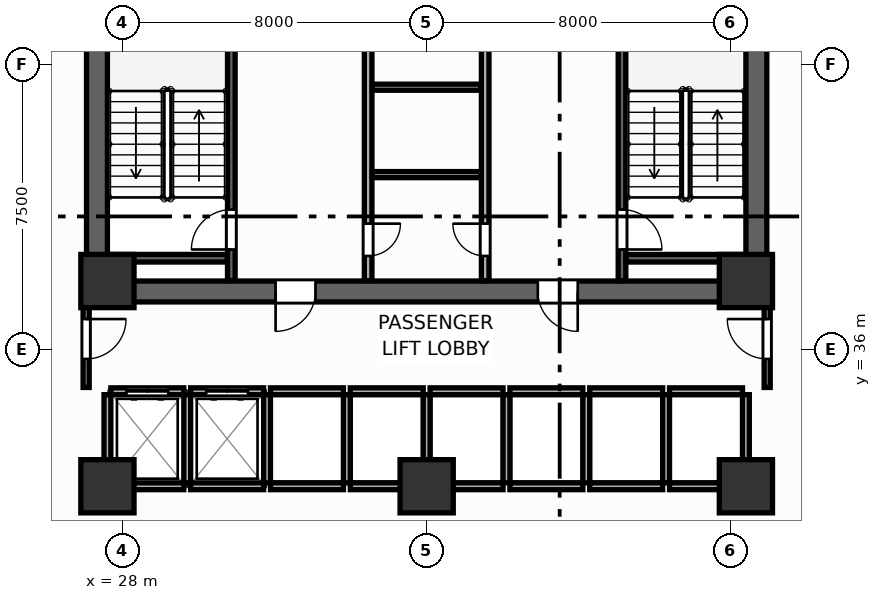
"""IFC4 building model, lengths in metres.
Left out: names, types, materials, properties, quantities, classifications, styles, units other than length and angle.
Written with IfcOpenShell. Run it as: python <this file> out.ifc"""

import sys

from ifc_helpers import new_model, si_unit, direction, frame, frame_2d, origin, origin_2d, place, context, subcontext, project, spatial, rectangle, extrude, source, transform, mapped, element, fill, save


model = new_model("IFC4")
c1 = context("Model", 3, precision=1e-05, world=origin(), true_north=direction((0.0, 1.0)))
c2 = subcontext(c1, "Body", "Model", "MODEL_VIEW")
j1 = project(units=[si_unit("LENGTHUNIT", "METRE"), si_unit("PLANEANGLEUNIT", "RADIAN")], contexts=[c1])
p1 = place(None, origin())
s1 = spatial("IfcSite", under=j1, at=p1, CompositionType="ELEMENT")
p2 = place(p1, origin())
s2 = spatial("IfcBuilding", under=s1, at=p2, CompositionType="ELEMENT")
p3 = place(p2, frame((0.0, 0.0, 24.0)))
s3 = spatial("IfcBuildingStorey", under=s2, at=p3, CompositionType="ELEMENT", Elevation=24.0)
p4 = place(p3, frame((27.05, 37.525, 0.0), z_axis=(0.0, 0.0, 1.0), x_axis=(1.0, 0.0, 0.0)))
e1 = element("IfcWall", 1, at=p4, inside=s3, PredefinedType="SHEAR", context=c2, shape_type="SweptSolid", body=[
    extrude(rectangle(XDim=17.9, YDim=0.55, at=frame_2d((8.95, 0.0))), origin(), (0.0, 0.0, 1.0), 3.9),
])
p5 = place(p4, frame((4.975, 0.0, 0.0)))
e2 = element("IfcOpeningElement", 2, at=p5, cuts=e1, PredefinedType="OPENING", context=c2, shape_type="SweptSolid", body=[
    extrude(rectangle(XDim=1.05, YDim=2.1, at=frame_2d((0.525, 1.05))), frame((0.0, 0.285, 0.0), z_axis=(0.0, -1.0, 0.0), x_axis=(1.0, 0.0, 0.0)), (0.0, 0.0, 1.0), 0.57),
])
p6 = place(p4, frame((11.875, 0.0, 0.0)))
e3 = element("IfcOpeningElement", 3, at=p6, cuts=e1, PredefinedType="OPENING", context=c2, shape_type="SweptSolid", body=[
    extrude(rectangle(XDim=1.05, YDim=2.1, at=frame_2d((0.525, 1.05))), frame((0.0, 0.285, 0.0), z_axis=(0.0, -1.0, 0.0), x_axis=(1.0, 0.0, 0.0)), (0.0, 0.0, 1.0), 0.57),
])
for number, where, z_axis, x_axis in (
    (4, (27.325, 37.8, 0.0), (0.0, 0.0, 1.0), (0.0, 1.0, 0.0)),
    (5, (44.675, 37.8, 0.0), (0.0, 0.0, 1.0), (0.0, 1.0, 0.0)),
):
    element("IfcWall", number, at=place(p3, frame(where, z_axis=z_axis, x_axis=x_axis)), inside=s3, PredefinedType="SHEAR", context=c2, shape_type="SweptSolid", body=[
        extrude(rectangle(XDim=9.0, YDim=0.55, at=frame_2d((4.5, 0.0))), origin(), (0.0, 0.0, 1.0), 3.9),
    ])
m1 = source(origin(), c2, "Body", "SweptSolid", [
    extrude(rectangle(XDim=1.4, YDim=1.4, at=origin_2d()), origin(), (0.0, 0.0, 1.0), 3.9),
])
for number, where, z_axis, x_axis in (
    (6, (27.6, 37.8, 0.0), (0.0, 0.0, 1.0), (1.0, 0.0, 0.0)),
    (7, (44.4, 37.8, 0.0), (0.0, 0.0, 1.0), (1.0, 0.0, 0.0)),
    (8, (27.6, 32.4, 0.0), (0.0, 0.0, 1.0), (1.0, 0.0, 0.0)),
    (9, (44.4, 32.4, 0.0), (0.0, 0.0, 1.0), (1.0, 0.0, 0.0)),
    (10, (36.0, 32.4, 0.0), (0.0, 0.0, 1.0), (1.0, 0.0, 0.0)),
):
    element("IfcColumn", number, at=place(p3, frame(where, z_axis=z_axis, x_axis=x_axis)), inside=s3, PredefinedType="COLUMN", context=c2, shape_type="MappedRepresentation", body=[
        mapped(m1, transform((0.0, 0.0, 0.0), scale=1.0)),
    ])
p7 = place(p3, frame((30.86, 37.81, 0.0), z_axis=(0.0, 0.0, 1.0), x_axis=(0.0, 1.0, 0.0)))
e11 = element("IfcWall", 11, at=p7, inside=s3, PredefinedType="SHEAR", context=c2, shape_type="SweptSolid", body=[
    extrude(rectangle(XDim=8.98, YDim=0.2, at=frame_2d((4.49, 0.0))), origin(), (0.0, 0.0, 1.0), 3.9),
])
p8 = place(p7, frame((0.82, 0.0, 0.0)))
e12 = element("IfcOpeningElement", 12, at=p8, cuts=e11, PredefinedType="OPENING", context=c2, shape_type="SweptSolid", body=[
    extrude(rectangle(XDim=1.05, YDim=2.1, at=frame_2d((0.525, 1.05))), frame((0.0, 0.11, 0.0), z_axis=(0.0, -1.0, 0.0), x_axis=(1.0, 0.0, 0.0)), (0.0, 0.0, 1.0), 0.22),
])
p9 = place(p3, frame((27.61, 38.4, 0.0), z_axis=(0.0, 0.0, 1.0), x_axis=(1.0, 0.0, 0.0)))
e13 = element("IfcWall", 13, at=p9, inside=s3, PredefinedType="SHEAR", context=c2, shape_type="SweptSolid", body=[
    extrude(rectangle(XDim=3.14, YDim=0.2, at=frame_2d((1.57, 0.0))), origin(), (0.0, 0.0, 1.0), 3.9),
])
p10 = place(p3, frame((41.14, 37.81, 0.0), z_axis=(0.0, 0.0, 1.0), x_axis=(0.0, 1.0, 0.0)))
e14 = element("IfcWall", 14, at=p10, inside=s3, PredefinedType="SHEAR", context=c2, shape_type="SweptSolid", body=[
    extrude(rectangle(XDim=8.98, YDim=0.2, at=frame_2d((4.49, 0.0))), origin(), (0.0, 0.0, 1.0), 3.9),
])
p11 = place(p10, frame((0.82, 0.0, 0.0)))
e15 = element("IfcOpeningElement", 15, at=p11, cuts=e14, PredefinedType="OPENING", context=c2, shape_type="SweptSolid", body=[
    extrude(rectangle(XDim=1.05, YDim=2.1, at=frame_2d((0.525, 1.05))), frame((0.0, 0.11, 0.0), z_axis=(0.0, -1.0, 0.0), x_axis=(1.0, 0.0, 0.0)), (0.0, 0.0, 1.0), 0.22),
])
p12 = place(p3, frame((41.25, 38.4, 0.0), z_axis=(0.0, 0.0, 1.0), x_axis=(1.0, 0.0, 0.0)))
e16 = element("IfcWall", 16, at=p12, inside=s3, PredefinedType="SHEAR", context=c2, shape_type="SweptSolid", body=[
    extrude(rectangle(XDim=3.14, YDim=0.2, at=frame_2d((1.57, 0.0))), origin(), (0.0, 0.0, 1.0), 3.9),
])
p13 = place(p3, frame((34.46, 37.81, 0.0), z_axis=(0.0, 0.0, 1.0), x_axis=(0.0, 1.0, 0.0)))
e17 = element("IfcWall", 17, at=p13, inside=s3, PredefinedType="PARTITIONING", context=c2, shape_type="SweptSolid", body=[
    extrude(rectangle(XDim=8.98, YDim=0.2, at=frame_2d((4.49, 0.0))), origin(), (0.0, 0.0, 1.0), 3.68),
])
p14 = place(p13, frame((0.65, 0.0, 0.0)))
e18 = element("IfcOpeningElement", 18, at=p14, cuts=e17, PredefinedType="OPENING", context=c2, shape_type="SweptSolid", body=[
    extrude(rectangle(XDim=0.85, YDim=2.05, at=frame_2d((0.425, 1.025))), frame((0.0, 0.11, 0.0), z_axis=(0.0, -1.0, 0.0), x_axis=(1.0, 0.0, 0.0)), (0.0, 0.0, 1.0), 0.22),
])
p15 = place(p3, frame((37.54, 37.81, 0.0), z_axis=(0.0, 0.0, 1.0), x_axis=(0.0, 1.0, 0.0)))
e19 = element("IfcWall", 19, at=p15, inside=s3, PredefinedType="PARTITIONING", context=c2, shape_type="SweptSolid", body=[
    extrude(rectangle(XDim=8.98, YDim=0.2, at=frame_2d((4.49, 0.0))), origin(), (0.0, 0.0, 1.0), 3.68),
])
p16 = place(p15, frame((0.65, 0.0, 0.0)))
e20 = element("IfcOpeningElement", 20, at=p16, cuts=e19, PredefinedType="OPENING", context=c2, shape_type="SweptSolid", body=[
    extrude(rectangle(XDim=0.85, YDim=2.05, at=frame_2d((0.425, 1.025))), frame((0.0, 0.11, 0.0), z_axis=(0.0, -1.0, 0.0), x_axis=(1.0, 0.0, 0.0)), (0.0, 0.0, 1.0), 0.22),
])
for number, where, z_axis, x_axis in (
    (21, (34.57, 40.6, 0.0), (0.0, 0.0, 1.0), (1.0, 0.0, 0.0)),
    (22, (34.57, 42.9, 0.0), (0.0, 0.0, 1.0), (1.0, 0.0, 0.0)),
):
    element("IfcWall", number, at=place(p3, frame(where, z_axis=z_axis, x_axis=x_axis)), inside=s3, PredefinedType="PARTITIONING", context=c2, shape_type="SweptSolid", body=[
        extrude(rectangle(XDim=2.86, YDim=0.16, at=frame_2d((1.43, 0.0))), origin(), (0.0, 0.0, 1.0), 3.68),
    ])
p17 = place(p3, frame((27.69, 34.9, 0.0), z_axis=(0.0, 0.0, 1.0), x_axis=(1.0, 0.0, 0.0)))
e23 = element("IfcWall", 23, at=p17, inside=s3, PredefinedType="PARTITIONING", context=c2, shape_type="SweptSolid", body=[
    extrude(rectangle(XDim=1.92, YDim=0.18, at=frame_2d((0.96, 0.0))), origin(), (0.0, 0.0, 1.0), 3.68),
])
p18 = place(p17, frame((0.41, 0.0, 0.0)))
e24 = element("IfcOpeningElement", 24, at=p18, cuts=e23, PredefinedType="OPENING", context=c2, shape_type="SweptSolid", body=[
    extrude(rectangle(XDim=1.1, YDim=2.1, at=frame_2d((0.55, 1.05))), frame((0.0, 0.1, 0.0), z_axis=(0.0, -1.0, 0.0), x_axis=(1.0, 0.0, 0.0)), (0.0, 0.0, 1.0), 0.2),
])
p19 = place(p3, frame((27.69, 32.4, 0.0), z_axis=(0.0, 0.0, 1.0), x_axis=(1.0, 0.0, 0.0)))
e25 = element("IfcWall", 25, at=p19, inside=s3, PredefinedType="PARTITIONING", context=c2, shape_type="SweptSolid", body=[
    extrude(rectangle(XDim=1.92, YDim=0.18, at=frame_2d((0.96, 0.0))), origin(), (0.0, 0.0, 1.0), 3.18),
])
p20 = place(p3, frame((27.6, 32.49, 0.0), z_axis=(0.0, 0.0, 1.0), x_axis=(0.0, 1.0, 0.0)))
e26 = element("IfcWall", 26, at=p20, inside=s3, PredefinedType="PARTITIONING", context=c2, shape_type="SweptSolid", body=[
    extrude(rectangle(XDim=2.32, YDim=0.18, at=frame_2d((1.16, 0.0))), origin(), (0.0, 0.0, 1.0), 3.68),
])
p21 = place(p3, frame((29.79, 34.9, 0.0), z_axis=(0.0, 0.0, 1.0), x_axis=(1.0, 0.0, 0.0)))
e27 = element("IfcWall", 27, at=p21, inside=s3, PredefinedType="PARTITIONING", context=c2, shape_type="SweptSolid", body=[
    extrude(rectangle(XDim=1.92, YDim=0.18, at=frame_2d((0.96, 0.0))), origin(), (0.0, 0.0, 1.0), 3.68),
])
p22 = place(p21, frame((0.41, 0.0, 0.0)))
e28 = element("IfcOpeningElement", 28, at=p22, cuts=e27, PredefinedType="OPENING", context=c2, shape_type="SweptSolid", body=[
    extrude(rectangle(XDim=1.1, YDim=2.1, at=frame_2d((0.55, 1.05))), frame((0.0, 0.1, 0.0), z_axis=(0.0, -1.0, 0.0), x_axis=(1.0, 0.0, 0.0)), (0.0, 0.0, 1.0), 0.2),
])
p23 = place(p3, frame((29.79, 32.4, 0.0), z_axis=(0.0, 0.0, 1.0), x_axis=(1.0, 0.0, 0.0)))
e29 = element("IfcWall", 29, at=p23, inside=s3, PredefinedType="PARTITIONING", context=c2, shape_type="SweptSolid", body=[
    extrude(rectangle(XDim=1.92, YDim=0.18, at=frame_2d((0.96, 0.0))), origin(), (0.0, 0.0, 1.0), 3.18),
])
p24 = place(p3, frame((29.7, 32.49, 0.0), z_axis=(0.0, 0.0, 1.0), x_axis=(0.0, 1.0, 0.0)))
e30 = element("IfcWall", 30, at=p24, inside=s3, PredefinedType="PARTITIONING", context=c2, shape_type="SweptSolid", body=[
    extrude(rectangle(XDim=2.32, YDim=0.18, at=frame_2d((1.16, 0.0))), origin(), (0.0, 0.0, 1.0), 3.68),
])
p25 = place(p3, frame((31.89, 34.9, 0.0), z_axis=(0.0, 0.0, 1.0), x_axis=(1.0, 0.0, 0.0)))
e31 = element("IfcWall", 31, at=p25, inside=s3, PredefinedType="PARTITIONING", context=c2, shape_type="SweptSolid", body=[
    extrude(rectangle(XDim=1.92, YDim=0.18, at=frame_2d((0.96, 0.0))), origin(), (0.0, 0.0, 1.0), 3.68),
])
p26 = place(p3, frame((31.89, 32.4, 0.0), z_axis=(0.0, 0.0, 1.0), x_axis=(1.0, 0.0, 0.0)))
e32 = element("IfcWall", 32, at=p26, inside=s3, PredefinedType="PARTITIONING", context=c2, shape_type="SweptSolid", body=[
    extrude(rectangle(XDim=1.92, YDim=0.18, at=frame_2d((0.96, 0.0))), origin(), (0.0, 0.0, 1.0), 3.18),
])
p27 = place(p3, frame((31.8, 32.49, 0.0), z_axis=(0.0, 0.0, 1.0), x_axis=(0.0, 1.0, 0.0)))
e33 = element("IfcWall", 33, at=p27, inside=s3, PredefinedType="PARTITIONING", context=c2, shape_type="SweptSolid", body=[
    extrude(rectangle(XDim=2.32, YDim=0.18, at=frame_2d((1.16, 0.0))), origin(), (0.0, 0.0, 1.0), 3.68),
])
p28 = place(p3, frame((33.99, 34.9, 0.0), z_axis=(0.0, 0.0, 1.0), x_axis=(1.0, 0.0, 0.0)))
e34 = element("IfcWall", 34, at=p28, inside=s3, PredefinedType="PARTITIONING", context=c2, shape_type="SweptSolid", body=[
    extrude(rectangle(XDim=1.92, YDim=0.18, at=frame_2d((0.96, 0.0))), origin(), (0.0, 0.0, 1.0), 3.68),
])
p29 = place(p3, frame((33.99, 32.4, 0.0), z_axis=(0.0, 0.0, 1.0), x_axis=(1.0, 0.0, 0.0)))
e35 = element("IfcWall", 35, at=p29, inside=s3, PredefinedType="PARTITIONING", context=c2, shape_type="SweptSolid", body=[
    extrude(rectangle(XDim=1.92, YDim=0.18, at=frame_2d((0.96, 0.0))), origin(), (0.0, 0.0, 1.0), 3.18),
])
p30 = place(p3, frame((33.9, 32.49, 0.0), z_axis=(0.0, 0.0, 1.0), x_axis=(0.0, 1.0, 0.0)))
e36 = element("IfcWall", 36, at=p30, inside=s3, PredefinedType="PARTITIONING", context=c2, shape_type="SweptSolid", body=[
    extrude(rectangle(XDim=2.32, YDim=0.18, at=frame_2d((1.16, 0.0))), origin(), (0.0, 0.0, 1.0), 3.68),
])
p31 = place(p3, frame((36.09, 34.9, 0.0), z_axis=(0.0, 0.0, 1.0), x_axis=(1.0, 0.0, 0.0)))
e37 = element("IfcWall", 37, at=p31, inside=s3, PredefinedType="PARTITIONING", context=c2, shape_type="SweptSolid", body=[
    extrude(rectangle(XDim=1.92, YDim=0.18, at=frame_2d((0.96, 0.0))), origin(), (0.0, 0.0, 1.0), 3.68),
])
p32 = place(p3, frame((36.09, 32.4, 0.0), z_axis=(0.0, 0.0, 1.0), x_axis=(1.0, 0.0, 0.0)))
e38 = element("IfcWall", 38, at=p32, inside=s3, PredefinedType="PARTITIONING", context=c2, shape_type="SweptSolid", body=[
    extrude(rectangle(XDim=1.92, YDim=0.18, at=frame_2d((0.96, 0.0))), origin(), (0.0, 0.0, 1.0), 3.18),
])
p33 = place(p3, frame((36.0, 32.49, 0.0), z_axis=(0.0, 0.0, 1.0), x_axis=(0.0, 1.0, 0.0)))
e39 = element("IfcWall", 39, at=p33, inside=s3, PredefinedType="PARTITIONING", context=c2, shape_type="SweptSolid", body=[
    extrude(rectangle(XDim=2.32, YDim=0.18, at=frame_2d((1.16, 0.0))), origin(), (0.0, 0.0, 1.0), 3.68),
])
p34 = place(p3, frame((38.19, 34.9, 0.0), z_axis=(0.0, 0.0, 1.0), x_axis=(1.0, 0.0, 0.0)))
e40 = element("IfcWall", 40, at=p34, inside=s3, PredefinedType="PARTITIONING", context=c2, shape_type="SweptSolid", body=[
    extrude(rectangle(XDim=1.92, YDim=0.18, at=frame_2d((0.96, 0.0))), origin(), (0.0, 0.0, 1.0), 3.68),
])
p35 = place(p3, frame((38.19, 32.4, 0.0), z_axis=(0.0, 0.0, 1.0), x_axis=(1.0, 0.0, 0.0)))
e41 = element("IfcWall", 41, at=p35, inside=s3, PredefinedType="PARTITIONING", context=c2, shape_type="SweptSolid", body=[
    extrude(rectangle(XDim=1.92, YDim=0.18, at=frame_2d((0.96, 0.0))), origin(), (0.0, 0.0, 1.0), 3.18),
])
p36 = place(p3, frame((38.1, 32.49, 0.0), z_axis=(0.0, 0.0, 1.0), x_axis=(0.0, 1.0, 0.0)))
e42 = element("IfcWall", 42, at=p36, inside=s3, PredefinedType="PARTITIONING", context=c2, shape_type="SweptSolid", body=[
    extrude(rectangle(XDim=2.32, YDim=0.18, at=frame_2d((1.16, 0.0))), origin(), (0.0, 0.0, 1.0), 3.68),
])
p37 = place(p3, frame((40.29, 34.9, 0.0), z_axis=(0.0, 0.0, 1.0), x_axis=(1.0, 0.0, 0.0)))
e43 = element("IfcWall", 43, at=p37, inside=s3, PredefinedType="PARTITIONING", context=c2, shape_type="SweptSolid", body=[
    extrude(rectangle(XDim=1.92, YDim=0.18, at=frame_2d((0.96, 0.0))), origin(), (0.0, 0.0, 1.0), 3.68),
])
p38 = place(p3, frame((40.29, 32.4, 0.0), z_axis=(0.0, 0.0, 1.0), x_axis=(1.0, 0.0, 0.0)))
e44 = element("IfcWall", 44, at=p38, inside=s3, PredefinedType="PARTITIONING", context=c2, shape_type="SweptSolid", body=[
    extrude(rectangle(XDim=1.92, YDim=0.18, at=frame_2d((0.96, 0.0))), origin(), (0.0, 0.0, 1.0), 3.18),
])
p39 = place(p3, frame((40.2, 32.49, 0.0), z_axis=(0.0, 0.0, 1.0), x_axis=(0.0, 1.0, 0.0)))
e45 = element("IfcWall", 45, at=p39, inside=s3, PredefinedType="PARTITIONING", context=c2, shape_type="SweptSolid", body=[
    extrude(rectangle(XDim=2.32, YDim=0.18, at=frame_2d((1.16, 0.0))), origin(), (0.0, 0.0, 1.0), 3.68),
])
p40 = place(p3, frame((42.39, 34.9, 0.0), z_axis=(0.0, 0.0, 1.0), x_axis=(1.0, 0.0, 0.0)))
e46 = element("IfcWall", 46, at=p40, inside=s3, PredefinedType="PARTITIONING", context=c2, shape_type="SweptSolid", body=[
    extrude(rectangle(XDim=1.92, YDim=0.18, at=frame_2d((0.96, 0.0))), origin(), (0.0, 0.0, 1.0), 3.68),
])
p41 = place(p3, frame((42.39, 32.4, 0.0), z_axis=(0.0, 0.0, 1.0), x_axis=(1.0, 0.0, 0.0)))
e47 = element("IfcWall", 47, at=p41, inside=s3, PredefinedType="PARTITIONING", context=c2, shape_type="SweptSolid", body=[
    extrude(rectangle(XDim=1.92, YDim=0.18, at=frame_2d((0.96, 0.0))), origin(), (0.0, 0.0, 1.0), 3.18),
])
for number, where, z_axis, x_axis in (
    (48, (42.3, 32.49, 0.0), (0.0, 0.0, 1.0), (0.0, 1.0, 0.0)),
    (49, (44.4, 32.49, 0.0), (0.0, 0.0, 1.0), (0.0, 1.0, 0.0)),
):
    element("IfcWall", number, at=place(p3, frame(where, z_axis=z_axis, x_axis=x_axis)), inside=s3, PredefinedType="PARTITIONING", context=c2, shape_type="SweptSolid", body=[
        extrude(rectangle(XDim=2.32, YDim=0.18, at=frame_2d((1.16, 0.0))), origin(), (0.0, 0.0, 1.0), 3.68),
    ])
p42 = place(p3, frame((27.04, 35.0, 0.0), z_axis=(0.0, 0.0, 1.0), x_axis=(0.0, 1.0, 0.0)))
e50 = element("IfcWall", 50, at=p42, inside=s3, PredefinedType="PARTITIONING", context=c2, shape_type="SweptSolid", body=[
    extrude(rectangle(XDim=2.65, YDim=0.16, at=frame_2d((1.325, 0.0))), origin(), (0.0, 0.0, 1.0), 3.68),
])
p43 = place(p42, frame((0.75, 0.0, 0.0)))
e51 = element("IfcOpeningElement", 51, at=p43, cuts=e50, PredefinedType="OPENING", context=c2, shape_type="SweptSolid", body=[
    extrude(rectangle(XDim=1.05, YDim=2.1, at=frame_2d((0.525, 1.05))), frame((0.0, 0.09, 0.0), z_axis=(0.0, -1.0, 0.0), x_axis=(1.0, 0.0, 0.0)), (0.0, 0.0, 1.0), 0.18),
])
p44 = place(p3, frame((44.96, 35.0, 0.0), z_axis=(0.0, 0.0, 1.0), x_axis=(0.0, 1.0, 0.0)))
e52 = element("IfcWall", 52, at=p44, inside=s3, PredefinedType="PARTITIONING", context=c2, shape_type="SweptSolid", body=[
    extrude(rectangle(XDim=2.65, YDim=0.16, at=frame_2d((1.325, 0.0))), origin(), (0.0, 0.0, 1.0), 3.68),
])
p45 = place(p44, frame((0.75, 0.0, 0.0)))
e53 = element("IfcOpeningElement", 53, at=p45, cuts=e52, PredefinedType="OPENING", context=c2, shape_type="SweptSolid", body=[
    extrude(rectangle(XDim=1.05, YDim=2.1, at=frame_2d((0.525, 1.05))), frame((0.0, 0.09, 0.0), z_axis=(0.0, -1.0, 0.0), x_axis=(1.0, 0.0, 0.0)), (0.0, 0.0, 1.0), 0.18),
])
p46 = place(p8, origin())
e54 = element("IfcDoor", 54, at=p46, inside=s3, OperationType="SINGLE_SWING_LEFT", PredefinedType="DOOR", context=c2, shape_type="SweptSolid", body=[
    extrude(rectangle(XDim=1.05, YDim=2.1, at=frame_2d((0.525, 1.05))), frame((0.0, 0.025, 0.0), z_axis=(0.0, -1.0, 0.0), x_axis=(1.0, 0.0, 0.0)), (0.0, 0.0, 1.0), 0.05),
])
fill(e12, e54)
p47 = place(p11, frame((1.05, 0.0, 0.0), z_axis=(0.0, 0.0, 1.0), x_axis=(-1.0, 0.0, 0.0)))
e55 = element("IfcDoor", 55, at=p47, inside=s3, OperationType="SINGLE_SWING_RIGHT", PredefinedType="DOOR", context=c2, shape_type="SweptSolid", body=[
    extrude(rectangle(XDim=1.05, YDim=2.1, at=frame_2d((0.525, 1.05))), frame((0.0, 0.025, 0.0), z_axis=(0.0, -1.0, 0.0), x_axis=(1.0, 0.0, 0.0)), (0.0, 0.0, 1.0), 0.05),
])
fill(e15, e55)
p48 = place(p14, frame((0.85, 0.0, 0.0), z_axis=(0.0, 0.0, 1.0), x_axis=(-1.0, 0.0, 0.0)))
e56 = element("IfcDoor", 56, at=p48, inside=s3, OperationType="SINGLE_SWING_LEFT", PredefinedType="DOOR", context=c2, shape_type="SweptSolid", body=[
    extrude(rectangle(XDim=0.85, YDim=2.05, at=frame_2d((0.425, 1.025))), frame((0.0, 0.025, 0.0), z_axis=(0.0, -1.0, 0.0), x_axis=(1.0, 0.0, 0.0)), (0.0, 0.0, 1.0), 0.05),
])
fill(e18, e56)
p49 = place(p16, origin())
e57 = element("IfcDoor", 57, at=p49, inside=s3, OperationType="SINGLE_SWING_RIGHT", PredefinedType="DOOR", context=c2, shape_type="SweptSolid", body=[
    extrude(rectangle(XDim=0.85, YDim=2.05, at=frame_2d((0.425, 1.025))), frame((0.0, 0.025, 0.0), z_axis=(0.0, -1.0, 0.0), x_axis=(1.0, 0.0, 0.0)), (0.0, 0.0, 1.0), 0.05),
])
fill(e20, e57)
p50 = place(p18, origin())
e58 = element("IfcDoor", 58, at=p50, inside=s3, OperationType="DOUBLE_DOOR_SLIDING", PredefinedType="DOOR", context=c2, shape_type="SweptSolid", body=[
    extrude(rectangle(XDim=1.1, YDim=2.1, at=frame_2d((0.55, 1.05))), frame((0.0, 0.025, 0.0), z_axis=(0.0, -1.0, 0.0), x_axis=(1.0, 0.0, 0.0)), (0.0, 0.0, 1.0), 0.05),
])
fill(e24, e58)
p51 = place(p22, origin())
e59 = element("IfcDoor", 59, at=p51, inside=s3, OperationType="DOUBLE_DOOR_SLIDING", PredefinedType="DOOR", context=c2, shape_type="SweptSolid", body=[
    extrude(rectangle(XDim=1.1, YDim=2.1, at=frame_2d((0.55, 1.05))), frame((0.0, 0.025, 0.0), z_axis=(0.0, -1.0, 0.0), x_axis=(1.0, 0.0, 0.0)), (0.0, 0.0, 1.0), 0.05),
])
fill(e28, e59)
p52 = place(p43, frame((1.05, 0.0, 0.0), z_axis=(0.0, 0.0, 1.0), x_axis=(-1.0, 0.0, 0.0)))
e60 = element("IfcDoor", 60, at=p52, inside=s3, OperationType="SINGLE_SWING_LEFT", PredefinedType="DOOR", context=c2, shape_type="SweptSolid", body=[
    extrude(rectangle(XDim=1.05, YDim=2.1, at=frame_2d((0.525, 1.05))), frame((0.0, 0.025, 0.0), z_axis=(0.0, -1.0, 0.0), x_axis=(1.0, 0.0, 0.0)), (0.0, 0.0, 1.0), 0.05),
])
fill(e51, e60)
p53 = place(p45, origin())
e61 = element("IfcDoor", 61, at=p53, inside=s3, OperationType="SINGLE_SWING_RIGHT", PredefinedType="DOOR", context=c2, shape_type="SweptSolid", body=[
    extrude(rectangle(XDim=1.05, YDim=2.1, at=frame_2d((0.525, 1.05))), frame((0.0, 0.025, 0.0), z_axis=(0.0, -1.0, 0.0), x_axis=(1.0, 0.0, 0.0)), (0.0, 0.0, 1.0), 0.05),
])
fill(e53, e61)
p54 = place(p5, frame((1.05, 0.0, 0.0), z_axis=(0.0, 0.0, 1.0), x_axis=(-1.0, 0.0, 0.0)))
e62 = element("IfcDoor", 62, at=p54, inside=s3, OperationType="SINGLE_SWING_RIGHT", PredefinedType="DOOR", context=c2, shape_type="SweptSolid", body=[
    extrude(rectangle(XDim=1.05, YDim=2.1, at=frame_2d((0.525, 1.05))), frame((0.0, 0.025, 0.0), z_axis=(0.0, -1.0, 0.0), x_axis=(1.0, 0.0, 0.0)), (0.0, 0.0, 1.0), 0.05),
])
fill(e2, e62)
p55 = place(p6, frame((1.05, 0.0, 0.0), z_axis=(0.0, 0.0, 1.0), x_axis=(-1.0, 0.0, 0.0)))
e63 = element("IfcDoor", 63, at=p55, inside=s3, OperationType="SINGLE_SWING_LEFT", PredefinedType="DOOR", context=c2, shape_type="SweptSolid", body=[
    extrude(rectangle(XDim=1.05, YDim=2.1, at=frame_2d((0.525, 1.05))), frame((0.0, 0.025, 0.0), z_axis=(0.0, -1.0, 0.0), x_axis=(1.0, 0.0, 0.0)), (0.0, 0.0, 1.0), 0.05),
])
fill(e3, e63)
save(model, sys.argv[1])
